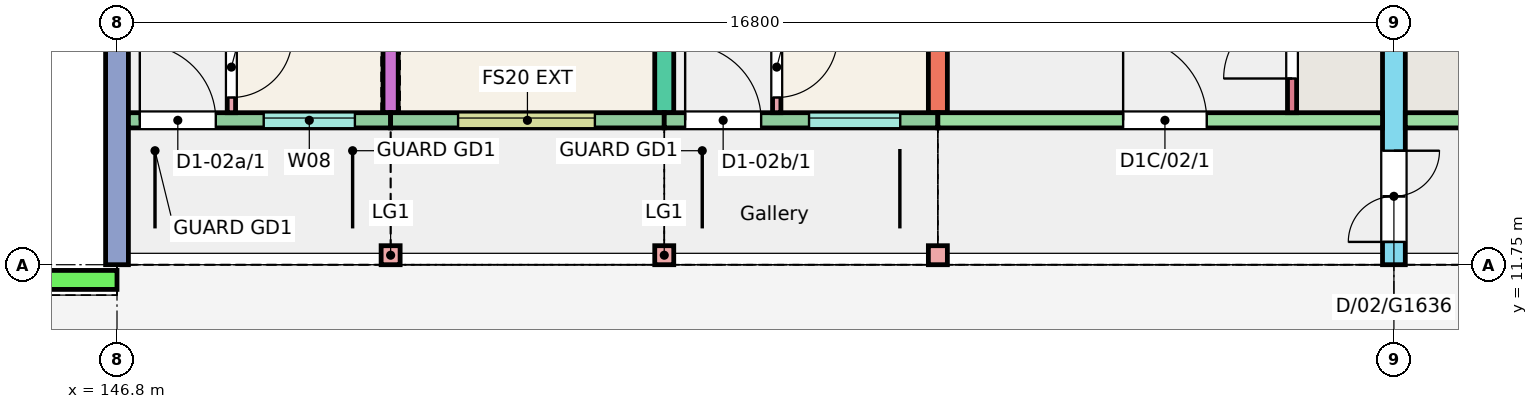
"""IFC4 building model, lengths in metres.
Left out: names, types, materials, properties, quantities, classifications, styles, units other than length and angle.
Written with IfcOpenShell. Run it as: python <this file> out.ifc"""

import sys

from ifc_helpers import new_model, si_unit, direction, frame, frame_2d, origin, origin_2d, place, context, subcontext, project, spatial, rectangle, extrude, element, fill, save


model = new_model("IFC4")
c1 = context("Model", 3, precision=1e-05, world=origin(), true_north=direction((0.0, 1.0)))
c2 = subcontext(c1, "Body", "Model", "MODEL_VIEW")
j1 = project(units=[si_unit("LENGTHUNIT", "METRE"), si_unit("PLANEANGLEUNIT", "RADIAN")], contexts=[c1])
p1 = place(None, origin())
s1 = spatial("IfcSite", under=j1, at=p1, CompositionType="ELEMENT")
p2 = place(p1, origin())
s2 = spatial("IfcBuilding", under=s1, at=p2, CompositionType="ELEMENT")
p3 = place(p2, frame((0.0, 0.0, 6.0)))
s3 = spatial("IfcBuildingStorey", under=s2, at=p3, CompositionType="ELEMENT", Elevation=6.0)
p4 = place(p3, frame((146.8, 11.75, 0.0), z_axis=(0.0, 0.0, 1.0), x_axis=(0.0, 1.0, 0.0)))
e1 = element("IfcWall", 1, at=p4, inside=s3, PredefinedType="SHEAR", context=c2, shape_type="SweptSolid", body=[
    extrude(rectangle(XDim=11.0, YDim=0.3, at=frame_2d((5.5, 0.0))), origin(), (0.0, 0.0, 1.0), 3.0),
])
p5 = place(p4, frame((8.005, 0.0, 0.9)))
e2 = element("IfcOpeningElement", 2, at=p5, cuts=e1, PredefinedType="OPENING", context=c2, shape_type="SweptSolid", body=[
    extrude(rectangle(XDim=1.8, YDim=1.5, at=frame_2d((0.9, 0.75))), frame((0.0, 0.16, 0.0), z_axis=(0.0, -1.0, 0.0), x_axis=(1.0, 0.0, 0.0)), (0.0, 0.0, 1.0), 0.32),
])
p6 = place(p3, frame((150.4, 13.75, 0.0), z_axis=(0.0, 0.0, 1.0), x_axis=(0.0, 1.0, 0.0)))
e3 = element("IfcWall", 3, at=p6, inside=s3, PredefinedType="SHEAR", context=c2, shape_type="SweptSolid", body=[
    extrude(rectangle(XDim=9.0, YDim=0.2, at=frame_2d((4.5, 0.0))), origin(), (0.0, 0.0, 1.0), 3.0),
])
p7 = place(p3, frame((154.0, 13.75, 0.0), z_axis=(0.0, 0.0, 1.0), x_axis=(0.0, 1.0, 0.0)))
e4 = element("IfcWall", 4, at=p7, inside=s3, PredefinedType="SHEAR", context=c2, shape_type="SweptSolid", body=[
    extrude(rectangle(XDim=9.0, YDim=0.25, at=frame_2d((4.5, 0.0))), origin(), (0.0, 0.0, 1.0), 3.0),
])
p8 = place(p7, frame((2.4, 0.0, 0.0)))
e5 = element("IfcOpeningElement", 5, at=p8, cuts=e4, PredefinedType="OPENING", context=c2, shape_type="SweptSolid", body=[
    extrude(rectangle(XDim=1.2, YDim=2.1, at=frame_2d((0.6, 1.05))), frame((0.0, 0.135, 0.0), z_axis=(0.0, -1.0, 0.0), x_axis=(1.0, 0.0, 0.0)), (0.0, 0.0, 1.0), 0.27),
])
p9 = place(p7, frame((6.4, 0.0, 0.0)))
e6 = element("IfcOpeningElement", 6, at=p9, cuts=e4, PredefinedType="OPENING", context=c2, shape_type="SweptSolid", body=[
    extrude(rectangle(XDim=1.2, YDim=2.1, at=frame_2d((0.6, 1.05))), frame((0.0, 0.135, 0.0), z_axis=(0.0, -1.0, 0.0), x_axis=(1.0, 0.0, 0.0)), (0.0, 0.0, 1.0), 0.27),
])
p10 = place(p3, frame((157.6, 13.75, 0.0), z_axis=(0.0, 0.0, 1.0), x_axis=(0.0, 1.0, 0.0)))
e7 = element("IfcWall", 7, at=p10, inside=s3, PredefinedType="SHEAR", context=c2, shape_type="SweptSolid", body=[
    extrude(rectangle(XDim=9.0, YDim=0.25, at=frame_2d((4.5, 0.0))), origin(), (0.0, 0.0, 1.0), 3.0),
])
p11 = place(p3, frame((163.6, 11.75, 0.0), z_axis=(0.0, 0.0, 1.0), x_axis=(0.0, 1.0, 0.0)))
e8 = element("IfcWall", 8, at=p11, inside=s3, PredefinedType="SHEAR", context=c2, shape_type="SweptSolid", body=[
    extrude(rectangle(XDim=11.0, YDim=0.3, at=frame_2d((5.5, 0.0))), origin(), (0.0, 0.0, 1.0), 3.0),
])
p12 = place(p11, frame((0.3, 0.0, 0.0)))
e9 = element("IfcOpeningElement", 9, at=p12, cuts=e8, PredefinedType="OPENING", context=c2, shape_type="SweptSolid", body=[
    extrude(rectangle(XDim=1.2, YDim=2.1, at=frame_2d((0.6, 1.05))), frame((0.0, 0.16, 0.0), z_axis=(0.0, -1.0, 0.0), x_axis=(1.0, 0.0, 0.0)), (0.0, 0.0, 1.0), 0.32),
])
p13 = place(p3, frame((146.95, 13.65, 0.0), z_axis=(0.0, 0.0, 1.0), x_axis=(1.0, 0.0, 0.0)))
e10 = element("IfcWall", 10, at=p13, inside=s3, PredefinedType="SOLIDWALL", context=c2, shape_type="SweptSolid", body=[
    extrude(rectangle(XDim=3.45, YDim=0.2, at=frame_2d((1.725, 0.0))), origin(), (0.0, 0.0, 1.0), 3.0),
])
p14 = place(p13, frame((1.78, 0.0, 1.1)))
e11 = element("IfcOpeningElement", 11, at=p14, cuts=e10, PredefinedType="OPENING", context=c2, shape_type="SweptSolid", body=[
    extrude(rectangle(XDim=1.2, YDim=1.3, at=frame_2d((0.6, 0.65))), frame((0.0, 0.11, 0.0), z_axis=(0.0, -1.0, 0.0), x_axis=(1.0, 0.0, 0.0)), (0.0, 0.0, 1.0), 0.22),
])
p15 = place(p13, frame((0.15, 0.0, 0.0)))
e12 = element("IfcOpeningElement", 12, at=p15, cuts=e10, PredefinedType="OPENING", context=c2, shape_type="SweptSolid", body=[
    extrude(rectangle(XDim=1.0, YDim=2.1, at=frame_2d((0.5, 1.05))), frame((0.0, 0.11, 0.0), z_axis=(0.0, -1.0, 0.0), x_axis=(1.0, 0.0, 0.0)), (0.0, 0.0, 1.0), 0.22),
])
p16 = place(p3, frame((150.4, 13.65, 0.0), z_axis=(0.0, 0.0, 1.0), x_axis=(1.0, 0.0, 0.0)))
e13 = element("IfcWall", 13, at=p16, inside=s3, PredefinedType="SOLIDWALL", context=c2, shape_type="SweptSolid", body=[
    extrude(rectangle(XDim=3.6, YDim=0.2, at=frame_2d((1.8, 0.0))), origin(), (0.0, 0.0, 1.0), 3.0),
])
p17 = place(p16, frame((0.887, 0.0, 1.1)))
e14 = element("IfcOpeningElement", 14, at=p17, cuts=e13, PredefinedType="OPENING", context=c2, shape_type="SweptSolid", body=[
    extrude(rectangle(XDim=1.8, YDim=1.3, at=frame_2d((0.9, 0.65))), frame((0.0, 0.11, 0.0), z_axis=(0.0, -1.0, 0.0), x_axis=(1.0, 0.0, 0.0)), (0.0, 0.0, 1.0), 0.22),
])
p18 = place(p3, frame((154.0, 13.65, 0.0), z_axis=(0.0, 0.0, 1.0), x_axis=(1.0, 0.0, 0.0)))
e15 = element("IfcWall", 15, at=p18, inside=s3, PredefinedType="SOLIDWALL", context=c2, shape_type="SweptSolid", body=[
    extrude(rectangle(XDim=3.6, YDim=0.2, at=frame_2d((1.8, 0.0))), origin(), (0.0, 0.0, 1.0), 3.0),
])
p19 = place(p18, frame((1.905, 0.0, 1.1)))
e16 = element("IfcOpeningElement", 16, at=p19, cuts=e15, PredefinedType="OPENING", context=c2, shape_type="SweptSolid", body=[
    extrude(rectangle(XDim=1.2, YDim=1.3, at=frame_2d((0.6, 0.65))), frame((0.0, 0.11, 0.0), z_axis=(0.0, -1.0, 0.0), x_axis=(1.0, 0.0, 0.0)), (0.0, 0.0, 1.0), 0.22),
])
p20 = place(p18, frame((0.275, 0.0, 0.0)))
e17 = element("IfcOpeningElement", 17, at=p20, cuts=e15, PredefinedType="OPENING", context=c2, shape_type="SweptSolid", body=[
    extrude(rectangle(XDim=1.0, YDim=2.1, at=frame_2d((0.5, 1.05))), frame((0.0, 0.11, 0.0), z_axis=(0.0, -1.0, 0.0), x_axis=(1.0, 0.0, 0.0)), (0.0, 0.0, 1.0), 0.22),
])
p21 = place(p3, frame((157.6, 13.65, 0.0), z_axis=(0.0, 0.0, 1.0), x_axis=(1.0, 0.0, 0.0)))
e18 = element("IfcWall", 18, at=p21, inside=s3, PredefinedType="SHEAR", context=c2, shape_type="SweptSolid", body=[
    extrude(rectangle(XDim=5.85, YDim=0.2, at=frame_2d((2.925, 0.0))), origin(), (0.0, 0.0, 1.0), 3.0),
])
p22 = place(p21, frame((2.438, 0.0, 0.0)))
e19 = element("IfcOpeningElement", 19, at=p22, cuts=e18, PredefinedType="OPENING", context=c2, shape_type="SweptSolid", body=[
    extrude(rectangle(XDim=1.1, YDim=2.1, at=frame_2d((0.55, 1.05))), frame((0.0, 0.11, 0.0), z_axis=(0.0, -1.0, 0.0), x_axis=(1.0, 0.0, 0.0)), (0.0, 0.0, 1.0), 0.22),
])
p23 = place(p3, frame((162.26, 13.75, 0.0), z_axis=(0.0, 0.0, 1.0), x_axis=(0.0, 1.0, 0.0)))
e20 = element("IfcWall", 20, at=p23, inside=s3, PredefinedType="SHEAR", context=c2, shape_type="SweptSolid", body=[
    extrude(rectangle(XDim=1.72, YDim=0.12, at=frame_2d((0.86, 0.0))), origin(), (0.0, 0.0, 1.0), 3.0),
])
p24 = place(p23, frame((0.45, 0.0, 0.0)))
e21 = element("IfcOpeningElement", 21, at=p24, cuts=e20, PredefinedType="OPENING", context=c2, shape_type="SweptSolid", body=[
    extrude(rectangle(XDim=0.9, YDim=2.1, at=frame_2d((0.45, 1.05))), frame((0.0, 0.07, 0.0), z_axis=(0.0, -1.0, 0.0), x_axis=(1.0, 0.0, 0.0)), (0.0, 0.0, 1.0), 0.14),
])
p25 = place(p3, frame((163.75, 13.65, 0.0), z_axis=(0.0, 0.0, 1.0), x_axis=(1.0, 0.0, 0.0)))
e22 = element("IfcWall", 22, at=p25, inside=s3, PredefinedType="SHEAR", context=c2, shape_type="SweptSolid", body=[
    extrude(rectangle(XDim=5.85, YDim=0.2, at=frame_2d((2.925, 0.0))), origin(), (0.0, 0.0, 1.0), 3.0),
])
p26 = place(p25, frame((2.312, 0.0, 0.0)))
e23 = element("IfcOpeningElement", 23, at=p26, cuts=e22, PredefinedType="OPENING", context=c2, shape_type="SweptSolid", body=[
    extrude(rectangle(XDim=1.1, YDim=2.1, at=frame_2d((0.55, 1.05))), frame((0.0, 0.11, 0.0), z_axis=(0.0, -1.0, 0.0), x_axis=(1.0, 0.0, 0.0)), (0.0, 0.0, 1.0), 0.22),
])
for number, where, z_axis, x_axis in (
    (24, (150.4, 11.875, 0.0), (0.0, 0.0, 1.0), (1.0, 0.0, 0.0)),
    (25, (154.0, 11.875, 0.0), (0.0, 0.0, 1.0), (1.0, 0.0, 0.0)),
    (26, (157.6, 11.875, 0.0), (0.0, 0.0, 1.0), (1.0, 0.0, 0.0)),
):
    element("IfcColumn", number, at=place(p3, frame(where, z_axis=z_axis, x_axis=x_axis)), inside=s3, PredefinedType="COLUMN", context=c2, shape_type="SweptSolid", body=[
        extrude(rectangle(XDim=0.25, YDim=0.25, at=origin_2d()), origin(), (0.0, 0.0, 1.0), 3.0),
    ])
p27 = place(p3, frame((132.8, 11.55, 0.0), z_axis=(0.0, 0.0, 1.0), x_axis=(1.0, 0.0, 0.0)))
e27 = element("IfcWall", 27, at=p27, inside=s3, PredefinedType="PARAPET", context=c2, shape_type="SweptSolid", body=[
    extrude(rectangle(XDim=14.0, YDim=0.25, at=frame_2d((7.0, 0.0))), origin(), (0.0, 0.0, 1.0), 1.1),
])
p28 = place(p3, frame((148.305, 13.75, 0.0), z_axis=(0.0, 0.0, 1.0), x_axis=(0.0, 1.0, 0.0)))
e28 = element("IfcWall", 28, at=p28, inside=s3, PredefinedType="PARTITIONING", context=c2, shape_type="SweptSolid", body=[
    extrude(rectangle(XDim=4.7, YDim=0.11, at=frame_2d((2.35, 0.0))), origin(), (0.0, 0.0, 1.0), 2.8),
])
p29 = place(p28, frame((0.2, 0.0, 0.0)))
e29 = element("IfcOpeningElement", 29, at=p29, cuts=e28, PredefinedType="OPENING", context=c2, shape_type="SweptSolid", body=[
    extrude(rectangle(XDim=0.8, YDim=2.1, at=frame_2d((0.4, 1.05))), frame((0.0, 0.065, 0.0), z_axis=(0.0, -1.0, 0.0), x_axis=(1.0, 0.0, 0.0)), (0.0, 0.0, 1.0), 0.13),
])
p30 = place(p28, frame((3.75, 0.0, 0.0)))
e30 = element("IfcOpeningElement", 30, at=p30, cuts=e28, PredefinedType="OPENING", context=c2, shape_type="SweptSolid", body=[
    extrude(rectangle(XDim=0.8, YDim=2.1, at=frame_2d((0.4, 1.05))), frame((0.0, 0.065, 0.0), z_axis=(0.0, -1.0, 0.0), x_axis=(1.0, 0.0, 0.0)), (0.0, 0.0, 1.0), 0.13),
])
p31 = place(p3, frame((155.48, 13.75, 0.0), z_axis=(0.0, 0.0, 1.0), x_axis=(0.0, 1.0, 0.0)))
e31 = element("IfcWall", 31, at=p31, inside=s3, PredefinedType="PARTITIONING", context=c2, shape_type="SweptSolid", body=[
    extrude(rectangle(XDim=4.5, YDim=0.11, at=frame_2d((2.25, 0.0))), origin(), (0.0, 0.0, 1.0), 2.8),
])
p32 = place(p31, frame((0.2, 0.0, 0.0)))
e32 = element("IfcOpeningElement", 32, at=p32, cuts=e31, PredefinedType="OPENING", context=c2, shape_type="SweptSolid", body=[
    extrude(rectangle(XDim=0.8, YDim=2.1, at=frame_2d((0.4, 1.05))), frame((0.0, 0.065, 0.0), z_axis=(0.0, -1.0, 0.0), x_axis=(1.0, 0.0, 0.0)), (0.0, 0.0, 1.0), 0.13),
])
p33 = place(p31, frame((3.55, 0.0, 0.0)))
e33 = element("IfcOpeningElement", 33, at=p33, cuts=e31, PredefinedType="OPENING", context=c2, shape_type="SweptSolid", body=[
    extrude(rectangle(XDim=0.8, YDim=2.1, at=frame_2d((0.4, 1.05))), frame((0.0, 0.065, 0.0), z_axis=(0.0, -1.0, 0.0), x_axis=(1.0, 0.0, 0.0)), (0.0, 0.0, 1.0), 0.13),
])
p34 = place(p14, origin())
e34 = element("IfcWindow", 34, at=p34, inside=s3, PartitioningType="SINGLE_PANEL", PredefinedType="WINDOW", context=c2, shape_type="SweptSolid", body=[
    extrude(rectangle(XDim=1.2, YDim=1.3, at=frame_2d((0.6, 0.65))), frame((0.0, 0.06, 0.0), z_axis=(0.0, -1.0, 0.0), x_axis=(1.0, 0.0, 0.0)), (0.0, 0.0, 1.0), 0.06),
])
fill(e11, e34)
p35 = place(p17, origin())
e35 = element("IfcWindow", 35, at=p35, inside=s3, PartitioningType="SINGLE_PANEL", PredefinedType="WINDOW", context=c2, shape_type="SweptSolid", body=[
    extrude(rectangle(XDim=1.8, YDim=1.3, at=frame_2d((0.9, 0.65))), frame((0.0, 0.06, 0.0), z_axis=(0.0, -1.0, 0.0), x_axis=(1.0, 0.0, 0.0)), (0.0, 0.0, 1.0), 0.06),
])
fill(e14, e35)
p36 = place(p19, origin())
e36 = element("IfcWindow", 36, at=p36, inside=s3, PartitioningType="SINGLE_PANEL", PredefinedType="WINDOW", context=c2, shape_type="SweptSolid", body=[
    extrude(rectangle(XDim=1.2, YDim=1.3, at=frame_2d((0.6, 0.65))), frame((0.0, 0.06, 0.0), z_axis=(0.0, -1.0, 0.0), x_axis=(1.0, 0.0, 0.0)), (0.0, 0.0, 1.0), 0.06),
])
fill(e16, e36)
p37 = place(p15, origin())
e37 = element("IfcDoor", 37, at=p37, inside=s3, OperationType="SINGLE_SWING_LEFT", PredefinedType="DOOR", context=c2, shape_type="SweptSolid", body=[
    extrude(rectangle(XDim=1.0, YDim=2.1, at=frame_2d((0.5, 1.05))), frame((0.0, 0.025, 0.0), z_axis=(0.0, -1.0, 0.0), x_axis=(1.0, 0.0, 0.0)), (0.0, 0.0, 1.0), 0.05),
])
fill(e12, e37)
p38 = place(p29, origin())
e38 = element("IfcDoor", 38, at=p38, inside=s3, OperationType="SINGLE_SWING_RIGHT", PredefinedType="DOOR", context=c2, shape_type="SweptSolid", body=[
    extrude(rectangle(XDim=0.8, YDim=2.1, at=frame_2d((0.4, 1.05))), frame((0.0, 0.025, 0.0), z_axis=(0.0, -1.0, 0.0), x_axis=(1.0, 0.0, 0.0)), (0.0, 0.0, 1.0), 0.05),
])
fill(e29, e38)
p39 = place(p20, origin())
e39 = element("IfcDoor", 39, at=p39, inside=s3, OperationType="SINGLE_SWING_LEFT", PredefinedType="DOOR", context=c2, shape_type="SweptSolid", body=[
    extrude(rectangle(XDim=1.0, YDim=2.1, at=frame_2d((0.5, 1.05))), frame((0.0, 0.025, 0.0), z_axis=(0.0, -1.0, 0.0), x_axis=(1.0, 0.0, 0.0)), (0.0, 0.0, 1.0), 0.05),
])
fill(e17, e39)
p40 = place(p32, origin())
e40 = element("IfcDoor", 40, at=p40, inside=s3, OperationType="SINGLE_SWING_RIGHT", PredefinedType="DOOR", context=c2, shape_type="SweptSolid", body=[
    extrude(rectangle(XDim=0.8, YDim=2.1, at=frame_2d((0.4, 1.05))), frame((0.0, 0.025, 0.0), z_axis=(0.0, -1.0, 0.0), x_axis=(1.0, 0.0, 0.0)), (0.0, 0.0, 1.0), 0.05),
])
fill(e32, e40)
p41 = place(p22, origin())
e41 = element("IfcDoor", 41, at=p41, inside=s3, OperationType="SINGLE_SWING_LEFT", PredefinedType="DOOR", context=c2, shape_type="SweptSolid", body=[
    extrude(rectangle(XDim=1.1, YDim=2.1, at=frame_2d((0.55, 1.05))), frame((0.0, 0.025, 0.0), z_axis=(0.0, -1.0, 0.0), x_axis=(1.0, 0.0, 0.0)), (0.0, 0.0, 1.0), 0.05),
])
fill(e19, e41)
p42 = place(p24, origin())
e42 = element("IfcDoor", 42, at=p42, inside=s3, OperationType="SINGLE_SWING_LEFT", PredefinedType="DOOR", context=c2, shape_type="SweptSolid", body=[
    extrude(rectangle(XDim=0.9, YDim=2.1, at=frame_2d((0.45, 1.05))), frame((0.0, 0.025, 0.0), z_axis=(0.0, -1.0, 0.0), x_axis=(1.0, 0.0, 0.0)), (0.0, 0.0, 1.0), 0.05),
])
fill(e21, e42)
p43 = place(p12, origin())
e43 = element("IfcDoor", 43, at=p43, inside=s3, OperationType="DOUBLE_DOOR_SINGLE_SWING", PredefinedType="DOOR", context=c2, shape_type="SweptSolid", body=[
    extrude(rectangle(XDim=1.2, YDim=2.1, at=frame_2d((0.6, 1.05))), frame((0.0, 0.025, 0.0), z_axis=(0.0, -1.0, 0.0), x_axis=(1.0, 0.0, 0.0)), (0.0, 0.0, 1.0), 0.05),
])
fill(e9, e43)
save(model, sys.argv[1])
